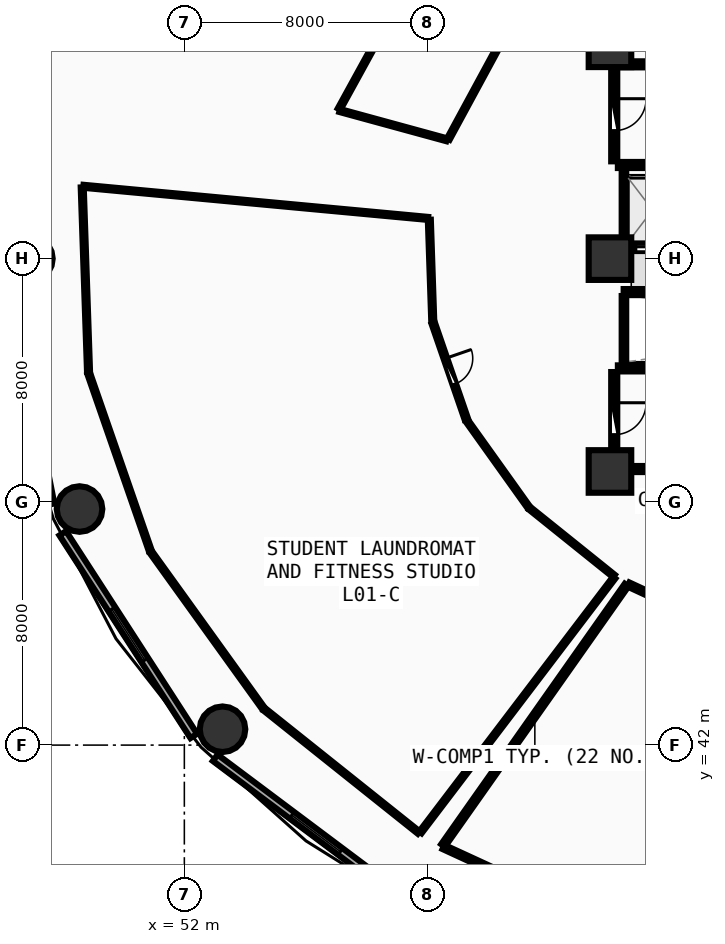
"""IFC4 building model, lengths in metres.
Left out: names, types, materials, properties, quantities, classifications, styles, units other than length and angle.
Written with IfcOpenShell. Run it as: python <this file> out.ifc"""

import sys

from ifc_helpers import new_model, si_unit, direction, frame, frame_2d, origin, origin_2d, place, context, subcontext, project, spatial, rectangle, circle, extrude, element, fill, save


model = new_model("IFC4")
c1 = context("Model", 3, precision=1e-05, world=origin(), true_north=direction((0.0, 1.0)))
c2 = subcontext(c1, "Body", "Model", "MODEL_VIEW")
j1 = project(units=[si_unit("LENGTHUNIT", "METRE"), si_unit("PLANEANGLEUNIT", "RADIAN")], contexts=[c1])
p1 = place(None, origin())
s1 = spatial("IfcSite", under=j1, at=p1, CompositionType="ELEMENT")
p2 = place(p1, origin())
s2 = spatial("IfcBuilding", under=s1, at=p2, CompositionType="ELEMENT")
p3 = place(p2, frame((0.0, 0.0, 4.5)))
s3 = spatial("IfcBuildingStorey", under=s2, at=p3, CompositionType="ELEMENT", Elevation=4.5)
for number, where, z_axis, x_axis in (
    (1, (66.0, 51.0, 0.0), (0.0, 0.0, 1.0), (1.0, 0.0, 0.0)),
    (2, (66.0, 65.0, 0.0), (0.0, 0.0, 1.0), (1.0, 0.0, 0.0)),
    (3, (66.0, 58.0, 0.0), (0.0, 0.0, 1.0), (1.0, 0.0, 0.0)),
):
    element("IfcColumn", number, at=place(p3, frame(where, z_axis=z_axis, x_axis=x_axis)), inside=s3, PredefinedType="PILASTER", context=c2, shape_type="SweptSolid", body=[
        extrude(rectangle(XDim=1.4, YDim=1.4, at=origin_2d()), origin(), (0.0, 0.0, 1.0), 4.5),
    ])
for number, where, z_axis, x_axis in (
    (4, (46.92, 58.0, 0.0), (0.0, 0.0, 1.0), (1.0, 0.0, 0.0)),
    (5, (48.553, 49.764, 0.0), (0.0, 0.0, 1.0), (1.0, 0.0, 0.0)),
    (6, (53.256, 42.522, 0.0), (0.0, 0.0, 1.0), (1.0, 0.0, 0.0)),
):
    element("IfcColumn", number, at=place(p3, frame(where, z_axis=z_axis, x_axis=x_axis)), inside=s3, PredefinedType="COLUMN", context=c2, shape_type="SweptSolid", body=[
        extrude(circle(Radius=0.75, at=origin_2d()), origin(), (0.0, 0.0, 1.0), 4.5),
    ])
p4 = place(p3, frame((47.596, 66.08, 0.0), z_axis=(0.0, 0.0, 1.0), x_axis=(-0.193726159581, -0.98105564322, 0.0)))
e7 = element("IfcWall", 7, at=p4, inside=s3, PredefinedType="SOLIDWALL", context=c2, shape_type="SweptSolid", body=[
    extrude(rectangle(XDim=7.703, YDim=0.26, at=frame_2d((3.851, 0.0))), origin(), (0.0, 0.0, 1.0), 4.185),
])
p5 = place(p4, frame((2.851, 0.0, 0.85)))
e8 = element("IfcOpeningElement", 8, at=p5, cuts=e7, PredefinedType="OPENING", context=c2, shape_type="SweptSolid", body=[
    extrude(rectangle(XDim=2.0, YDim=1.75, at=frame_2d((1.0, 0.875))), frame((0.0, 0.14, 0.0), z_axis=(0.0, -1.0, 0.0), x_axis=(1.0, 0.0, 0.0)), (0.0, 0.0, 1.0), 0.28),
])
p6 = place(p3, frame((46.104, 57.477, 0.0), z_axis=(0.0, 0.0, 1.0), x_axis=(0.193726159581, -0.98105564322, 0.0)))
e9 = element("IfcWall", 9, at=p6, inside=s3, PredefinedType="SOLIDWALL", context=c2, shape_type="SweptSolid", body=[
    extrude(rectangle(XDim=7.703, YDim=0.26, at=frame_2d((3.851, 0.0))), origin(), (0.0, 0.0, 1.0), 4.185),
])
p7 = place(p6, frame((2.851, 0.0, 0.85)))
e10 = element("IfcOpeningElement", 10, at=p7, cuts=e9, PredefinedType="OPENING", context=c2, shape_type="SweptSolid", body=[
    extrude(rectangle(XDim=2.0, YDim=1.75, at=frame_2d((1.0, 0.875))), frame((0.0, 0.14, 0.0), z_axis=(0.0, -1.0, 0.0), x_axis=(1.0, 0.0, 0.0)), (0.0, 0.0, 1.0), 0.28),
])
p8 = place(p3, frame((48.001, 48.967, 0.0), z_axis=(0.0, 0.0, 1.0), x_axis=(0.543005114258, -0.839729388488, 0.0)))
e11 = element("IfcWall", 11, at=p8, inside=s3, PredefinedType="SOLIDWALL", context=c2, shape_type="SweptSolid", body=[
    extrude(rectangle(XDim=7.938, YDim=0.26, at=frame_2d((3.969, 0.0))), origin(), (0.0, 0.0, 1.0), 4.185),
])
p9 = place(p8, frame((2.969, 0.0, 0.85)))
e12 = element("IfcOpeningElement", 12, at=p9, cuts=e11, PredefinedType="OPENING", context=c2, shape_type="SweptSolid", body=[
    extrude(rectangle(XDim=2.0, YDim=1.75, at=frame_2d((1.0, 0.875))), frame((0.0, 0.14, 0.0), z_axis=(0.0, -1.0, 0.0), x_axis=(1.0, 0.0, 0.0)), (0.0, 0.0, 1.0), 0.28),
])
p10 = place(p3, frame((53.016, 41.582, 0.0), z_axis=(0.0, 0.0, 1.0), x_axis=(0.80030733173, -0.599590005569, 0.0)))
e13 = element("IfcWall", 13, at=p10, inside=s3, PredefinedType="SOLIDWALL", context=c2, shape_type="SweptSolid", body=[
    extrude(rectangle(XDim=8.291, YDim=0.26, at=frame_2d((4.145, 0.0))), origin(), (0.0, 0.0, 1.0), 4.185),
])
p11 = place(p10, frame((3.145, 0.0, 0.85)))
e14 = element("IfcOpeningElement", 14, at=p11, cuts=e13, PredefinedType="OPENING", context=c2, shape_type="SweptSolid", body=[
    extrude(rectangle(XDim=2.0, YDim=1.75, at=frame_2d((1.0, 0.875))), frame((0.0, 0.14, 0.0), z_axis=(0.0, -1.0, 0.0), x_axis=(1.0, 0.0, 0.0)), (0.0, 0.0, 1.0), 0.28),
])
for number, where, z_axis, x_axis in (
    (15, (66.26, 61.08, 0.0), (0.0, 0.0, 1.0), (1.0, 0.0, 0.0)),
    (16, (73.42, 64.39, 0.0), (0.0, 0.0, 1.0), (-1.0, 0.0, 0.0)),
):
    element("IfcWall", number, at=place(p3, frame(where, z_axis=z_axis, x_axis=x_axis)), inside=s3, PredefinedType="SHEAR", context=c2, shape_type="SweptSolid", body=[
        extrude(rectangle(XDim=7.16, YDim=0.2, at=frame_2d((3.58, 0.0))), origin(), (0.0, 0.0, 1.0), 4.2),
    ])
p12 = place(p3, frame((66.14, 64.27, 0.0), z_axis=(0.0, 0.0, 1.0), x_axis=(0.0, -1.0, 0.0)))
e17 = element("IfcWall", 17, at=p12, inside=s3, PredefinedType="SHEAR", context=c2, shape_type="SweptSolid", body=[
    extrude(rectangle(XDim=3.07, YDim=0.2, at=frame_2d((1.535, 0.0))), origin(), (0.0, 0.0, 1.0), 4.2),
])
p13 = place(p12, frame((1.01, 0.0, 0.0)))
e18 = element("IfcOpeningElement", 18, at=p13, cuts=e17, PredefinedType="OPENING", context=c2, shape_type="SweptSolid", body=[
    extrude(rectangle(XDim=1.05, YDim=2.1, at=frame_2d((0.525, 1.05))), frame((0.0, 0.11, 0.0), z_axis=(0.0, -1.0, 0.0), x_axis=(1.0, 0.0, 0.0)), (0.0, 0.0, 1.0), 0.22),
])
for number, where, z_axis, x_axis in (
    (19, (66.26, 51.08, 0.0), (0.0, 0.0, 1.0), (1.0, 0.0, 0.0)),
    (20, (73.42, 54.39, 0.0), (0.0, 0.0, 1.0), (-1.0, 0.0, 0.0)),
):
    element("IfcWall", number, at=place(p3, frame(where, z_axis=z_axis, x_axis=x_axis)), inside=s3, PredefinedType="SHEAR", context=c2, shape_type="SweptSolid", body=[
        extrude(rectangle(XDim=7.16, YDim=0.2, at=frame_2d((3.58, 0.0))), origin(), (0.0, 0.0, 1.0), 4.2),
    ])
p14 = place(p3, frame((66.14, 54.27, 0.0), z_axis=(0.0, 0.0, 1.0), x_axis=(0.0, -1.0, 0.0)))
e21 = element("IfcWall", 21, at=p14, inside=s3, PredefinedType="SHEAR", context=c2, shape_type="SweptSolid", body=[
    extrude(rectangle(XDim=3.07, YDim=0.2, at=frame_2d((1.535, 0.0))), origin(), (0.0, 0.0, 1.0), 4.2),
])
p15 = place(p14, frame((1.01, 0.0, 0.0)))
e22 = element("IfcOpeningElement", 22, at=p15, cuts=e21, PredefinedType="OPENING", context=c2, shape_type="SweptSolid", body=[
    extrude(rectangle(XDim=1.05, YDim=2.1, at=frame_2d((0.525, 1.05))), frame((0.0, 0.11, 0.0), z_axis=(0.0, -1.0, 0.0), x_axis=(1.0, 0.0, 0.0)), (0.0, 0.0, 1.0), 0.22),
])
p16 = place(p3, frame((66.45, 58.35, 0.0), z_axis=(0.0, 0.0, 1.0), x_axis=(1.0, 0.0, 0.0)))
e23 = element("IfcWall", 23, at=p16, inside=s3, PredefinedType="SOLIDWALL", context=c2, shape_type="SweptSolid", body=[
    extrude(rectangle(XDim=6.0, YDim=0.2, at=frame_2d((3.0, 0.0))), origin(), (0.0, 0.0, 1.0), 4.19),
])
p17 = place(p16, frame((0.4, 0.0, 0.0)))
e24 = element("IfcOpeningElement", 24, at=p17, cuts=e23, PredefinedType="OPENING", context=c2, shape_type="SweptSolid", body=[
    extrude(rectangle(XDim=1.1, YDim=2.1, at=frame_2d((0.55, 1.05))), frame((0.0, 0.11, 0.0), z_axis=(0.0, -1.0, 0.0), x_axis=(1.0, 0.0, 0.0)), (0.0, 0.0, 1.0), 0.22),
])
p18 = place(p16, frame((2.4, 0.0, 0.0)))
e25 = element("IfcOpeningElement", 25, at=p18, cuts=e23, PredefinedType="OPENING", context=c2, shape_type="SweptSolid", body=[
    extrude(rectangle(XDim=1.1, YDim=2.1, at=frame_2d((0.55, 1.05))), frame((0.0, 0.11, 0.0), z_axis=(0.0, -1.0, 0.0), x_axis=(1.0, 0.0, 0.0)), (0.0, 0.0, 1.0), 0.22),
])
p19 = place(p16, frame((4.4, 0.0, 0.0)))
e26 = element("IfcOpeningElement", 26, at=p19, cuts=e23, PredefinedType="OPENING", context=c2, shape_type="SweptSolid", body=[
    extrude(rectangle(XDim=1.1, YDim=2.1, at=frame_2d((0.55, 1.05))), frame((0.0, 0.11, 0.0), z_axis=(0.0, -1.0, 0.0), x_axis=(1.0, 0.0, 0.0)), (0.0, 0.0, 1.0), 0.22),
])
p20 = place(p3, frame((66.46, 58.48, 0.0), z_axis=(0.0, 0.0, 1.0), x_axis=(0.0, 1.0, 0.0)))
e27 = element("IfcWall", 27, at=p20, inside=s3, PredefinedType="PARTITIONING", context=c2, shape_type="SweptSolid", body=[
    extrude(rectangle(XDim=2.46, YDim=0.15, at=frame_2d((1.23, 0.0))), origin(), (0.0, 0.0, 1.0), 4.19),
])
p21 = place(p3, frame((66.45, 56.9, 0.0), z_axis=(0.0, 0.0, 1.0), x_axis=(1.0, 0.0, 0.0)))
e28 = element("IfcWall", 28, at=p21, inside=s3, PredefinedType="SOLIDWALL", context=c2, shape_type="SweptSolid", body=[
    extrude(rectangle(XDim=14.4, YDim=0.2, at=frame_2d((7.2, 0.0))), origin(), (0.0, 0.0, 1.0), 4.19),
])
p22 = place(p3, frame((66.46, 54.48, 0.0), z_axis=(0.0, 0.0, 1.0), x_axis=(0.0, 1.0, 0.0)))
e29 = element("IfcWall", 29, at=p22, inside=s3, PredefinedType="PARTITIONING", context=c2, shape_type="SweptSolid", body=[
    extrude(rectangle(XDim=2.29, YDim=0.15, at=frame_2d((1.145, 0.0))), origin(), (0.0, 0.0, 1.0), 4.19),
])
p23 = place(p3, frame((60.192, 55.86, 0.0), z_axis=(0.0, 0.0, 1.0), x_axis=(0.326296764791, -0.945267380843, 0.0)))
e30 = element("IfcWall", 30, at=p23, inside=s3, PredefinedType="PARTITIONING", context=c2, shape_type="SweptSolid", body=[
    extrude(rectangle(XDim=3.318, YDim=0.12, at=frame_2d((1.659, 0.0))), origin(), (0.0, 0.0, 1.0), 4.19),
])
p24 = place(p23, frame((1.209, 0.0, 0.0)))
e31 = element("IfcOpeningElement", 31, at=p24, cuts=e30, PredefinedType="OPENING", context=c2, shape_type="SweptSolid", body=[
    extrude(rectangle(XDim=0.9, YDim=2.08, at=frame_2d((0.45, 1.04))), frame((0.0, 0.07, 0.0), z_axis=(0.0, -1.0, 0.0), x_axis=(1.0, 0.0, 0.0)), (0.0, 0.0, 1.0), 0.14),
])
p25 = place(p3, frame((62.358, 65.022, 0.0), z_axis=(0.0, 0.0, 1.0), x_axis=(-0.476511645664, -0.879168158856, 0.0)))
e32 = element("IfcWall", 32, at=p25, inside=s3, PredefinedType="PARTITIONING", context=c2, shape_type="SweptSolid", body=[
    extrude(rectangle(XDim=3.511, YDim=0.1, at=frame_2d((1.755, 0.0))), origin(), (0.0, 0.0, 1.0), 4.19),
])
p26 = place(p3, frame((60.627, 61.91, 0.0), z_axis=(0.0, 0.0, 1.0), x_axis=(-0.964640120238, 0.263570556831, 0.0)))
e33 = element("IfcWall", 33, at=p26, inside=s3, PredefinedType="PARTITIONING", context=c2, shape_type="SweptSolid", body=[
    extrude(rectangle(XDim=3.647, YDim=0.1, at=frame_2d((1.823, 0.0))), origin(), (0.0, 0.0, 1.0), 3.945),
])
p27 = place(p3, frame((57.09, 62.917, 0.0), z_axis=(0.0, 0.0, 1.0), x_axis=(0.481529459126, 0.876429905922, 0.0)))
e34 = element("IfcWall", 34, at=p27, inside=s3, PredefinedType="PARTITIONING", context=c2, shape_type="SweptSolid", body=[
    extrude(rectangle(XDim=4.43, YDim=0.1, at=frame_2d((2.215, 0.0))), origin(), (0.0, 0.0, 1.0), 3.585),
])
p28 = place(p3, frame((60.058, 59.279, 0.0), z_axis=(0.0, 0.0, 1.0), x_axis=(0.033786827999, -0.999429062142, 0.0)))
e35 = element("IfcWall", 35, at=p28, inside=s3, PredefinedType="PARTITIONING", context=c2, shape_type="SweptSolid", body=[
    extrude(rectangle(XDim=3.324, YDim=0.1, at=frame_2d((1.662, 0.0))), origin(), (0.0, 0.0, 1.0), 3.585),
])
p29 = place(p3, frame((61.317, 52.635, 0.0), z_axis=(0.0, 0.0, 1.0), x_axis=(0.581265057715, -0.813714281968, 0.0)))
e36 = element("IfcWall", 36, at=p29, inside=s3, PredefinedType="PARTITIONING", context=c2, shape_type="SweptSolid", body=[
    extrude(rectangle(XDim=3.439, YDim=0.1, at=frame_2d((1.719, 0.0))), origin(), (0.0, 0.0, 1.0), 3.585),
])
p30 = place(p3, frame((63.37, 49.779, 0.0), z_axis=(0.0, 0.0, 1.0), x_axis=(0.779622016763, -0.626250358067, 0.0)))
e37 = element("IfcWall", 37, at=p30, inside=s3, PredefinedType="PARTITIONING", context=c2, shape_type="SweptSolid", body=[
    extrude(rectangle(XDim=3.539, YDim=0.1, at=frame_2d((1.769, 0.0))), origin(), (0.0, 0.0, 1.0), 3.585),
])
p31 = place(p3, frame((66.136, 47.506, 0.0), z_axis=(0.0, 0.0, 1.0), x_axis=(-0.605364986989, -0.795948008684, 0.0)))
e38 = element("IfcWall", 38, at=p31, inside=s3, PredefinedType="PARTITIONING", context=c2, shape_type="SweptSolid", body=[
    extrude(rectangle(XDim=10.524, YDim=0.1, at=frame_2d((5.262, 0.0))), origin(), (0.0, 0.0, 1.0), 3.585),
])
p32 = place(p3, frame((59.71, 39.123, 0.0), z_axis=(0.0, 0.0, 1.0), x_axis=(-0.781602893215, 0.623776335972, 0.0)))
e39 = element("IfcWall", 39, at=p32, inside=s3, PredefinedType="PARTITIONING", context=c2, shape_type="SweptSolid", body=[
    extrude(rectangle(XDim=6.485, YDim=0.1, at=frame_2d((3.242, 0.0))), origin(), (0.0, 0.0, 1.0), 4.19),
])
p33 = place(p3, frame((54.587, 43.226, 0.0), z_axis=(0.0, 0.0, 1.0), x_axis=(-0.584098181026, 0.811683013819, 0.0)))
e40 = element("IfcWall", 40, at=p33, inside=s3, PredefinedType="PARTITIONING", context=c2, shape_type="SweptSolid", body=[
    extrude(rectangle(XDim=6.291, YDim=0.1, at=frame_2d((3.145, 0.0))), origin(), (0.0, 0.0, 1.0), 3.585),
])
p34 = place(p3, frame((50.876, 48.402, 0.0), z_axis=(0.0, 0.0, 1.0), x_axis=(-0.328006758099, 0.944675376328, 0.0)))
e41 = element("IfcWall", 41, at=p34, inside=s3, PredefinedType="PARTITIONING", context=c2, shape_type="SweptSolid", body=[
    extrude(rectangle(XDim=6.137, YDim=0.1, at=frame_2d((3.068, 0.0))), origin(), (0.0, 0.0, 1.0), 3.585),
])
p35 = place(p3, frame((48.849, 54.277, 0.0), z_axis=(0.0, 0.0, 1.0), x_axis=(-0.034150558558, 0.999416699555, 0.0)))
e42 = element("IfcWall", 42, at=p35, inside=s3, PredefinedType="PARTITIONING", context=c2, shape_type="SweptSolid", body=[
    extrude(rectangle(XDim=6.07, YDim=0.1, at=frame_2d((3.035, 0.0))), origin(), (0.0, 0.0, 1.0), 3.585),
])
p36 = place(p3, frame((48.68, 60.379, 0.0), z_axis=(0.0, 0.0, 1.0), x_axis=(0.995685013566, -0.092797380135, 0.0)))
e43 = element("IfcWall", 43, at=p36, inside=s3, PredefinedType="PARTITIONING", context=c2, shape_type="SweptSolid", body=[
    extrude(rectangle(XDim=11.386, YDim=0.1, at=frame_2d((5.693, 0.0))), origin(), (0.0, 0.0, 1.0), 3.885),
])
p37 = place(p3, frame((66.607, 47.281, 0.0), z_axis=(0.0, 0.0, 1.0), x_axis=(0.907209153003, -0.420679869625, 0.0)))
e44 = element("IfcWall", 44, at=p37, inside=s3, PredefinedType="PARTITIONING", context=c2, shape_type="SweptSolid", body=[
    extrude(rectangle(XDim=2.195, YDim=0.15, at=frame_2d((1.097, 0.0))), origin(), (0.0, 0.0, 1.0), 3.585),
])
p38 = place(p3, frame((64.206, 36.953, 0.0), z_axis=(0.0, 0.0, 1.0), x_axis=(-0.908344989121, 0.418221688508, 0.0)))
e45 = element("IfcWall", 45, at=p38, inside=s3, PredefinedType="PARTITIONING", context=c2, shape_type="SweptSolid", body=[
    extrude(rectangle(XDim=4.054, YDim=0.15, at=frame_2d((2.027, 0.0))), origin(), (0.0, 0.0, 1.0), 3.585),
])
p39 = place(p3, frame((60.51, 38.698, 0.0), z_axis=(0.0, 0.0, 1.0), x_axis=(0.576068501476, 0.817401420116, 0.0)))
e46 = element("IfcWall", 46, at=p39, inside=s3, PredefinedType="PARTITIONING", context=c2, shape_type="SweptSolid", body=[
    extrude(rectangle(XDim=10.481, YDim=0.15, at=frame_2d((5.241, 0.0))), origin(), (0.0, 0.0, 1.0), 3.585),
])
p40 = place(p9, origin())
e47 = element("IfcWindow", 47, at=p40, inside=s3, PartitioningType="SINGLE_PANEL", PredefinedType="WINDOW", context=c2, shape_type="SweptSolid", body=[
    extrude(rectangle(XDim=2.0, YDim=1.75, at=frame_2d((1.0, 0.875))), frame((0.0, 0.03, 0.0), z_axis=(0.0, -1.0, 0.0), x_axis=(1.0, 0.0, 0.0)), (0.0, 0.0, 1.0), 0.06),
])
fill(e12, e47)
p41 = place(p11, origin())
e48 = element("IfcWindow", 48, at=p41, inside=s3, PartitioningType="SINGLE_PANEL", PredefinedType="WINDOW", context=c2, shape_type="SweptSolid", body=[
    extrude(rectangle(XDim=2.0, YDim=1.75, at=frame_2d((1.0, 0.875))), frame((0.0, 0.03, 0.0), z_axis=(0.0, -1.0, 0.0), x_axis=(1.0, 0.0, 0.0)), (0.0, 0.0, 1.0), 0.06),
])
fill(e14, e48)
p42 = place(p13, origin())
e49 = element("IfcDoor", 49, at=p42, inside=s3, OperationType="SINGLE_SWING_LEFT", PredefinedType="DOOR", context=c2, shape_type="SweptSolid", body=[
    extrude(rectangle(XDim=1.05, YDim=2.1, at=frame_2d((0.525, 1.05))), frame((0.0, 0.025, 0.0), z_axis=(0.0, -1.0, 0.0), x_axis=(1.0, 0.0, 0.0)), (0.0, 0.0, 1.0), 0.05),
])
fill(e18, e49)
p43 = place(p15, origin())
e50 = element("IfcDoor", 50, at=p43, inside=s3, OperationType="SINGLE_SWING_LEFT", PredefinedType="DOOR", context=c2, shape_type="SweptSolid", body=[
    extrude(rectangle(XDim=1.05, YDim=2.1, at=frame_2d((0.525, 1.05))), frame((0.0, 0.025, 0.0), z_axis=(0.0, -1.0, 0.0), x_axis=(1.0, 0.0, 0.0)), (0.0, 0.0, 1.0), 0.05),
])
fill(e22, e50)
p44 = place(p17, origin())
e51 = element("IfcDoor", 51, at=p44, inside=s3, OperationType="DOUBLE_DOOR_SLIDING", PredefinedType="DOOR", context=c2, shape_type="SweptSolid", body=[
    extrude(rectangle(XDim=1.1, YDim=2.1, at=frame_2d((0.55, 1.05))), frame((0.0, 0.025, 0.0), z_axis=(0.0, -1.0, 0.0), x_axis=(1.0, 0.0, 0.0)), (0.0, 0.0, 1.0), 0.05),
])
fill(e24, e51)
p45 = place(p24, origin())
e52 = element("IfcDoor", 52, at=p45, inside=s3, OperationType="SINGLE_SWING_LEFT", PredefinedType="DOOR", context=c2, shape_type="SweptSolid", body=[
    extrude(rectangle(XDim=0.9, YDim=2.08, at=frame_2d((0.45, 1.04))), frame((0.0, 0.025, 0.0), z_axis=(0.0, -1.0, 0.0), x_axis=(1.0, 0.0, 0.0)), (0.0, 0.0, 1.0), 0.05),
])
fill(e31, e52)
save(model, sys.argv[1])
